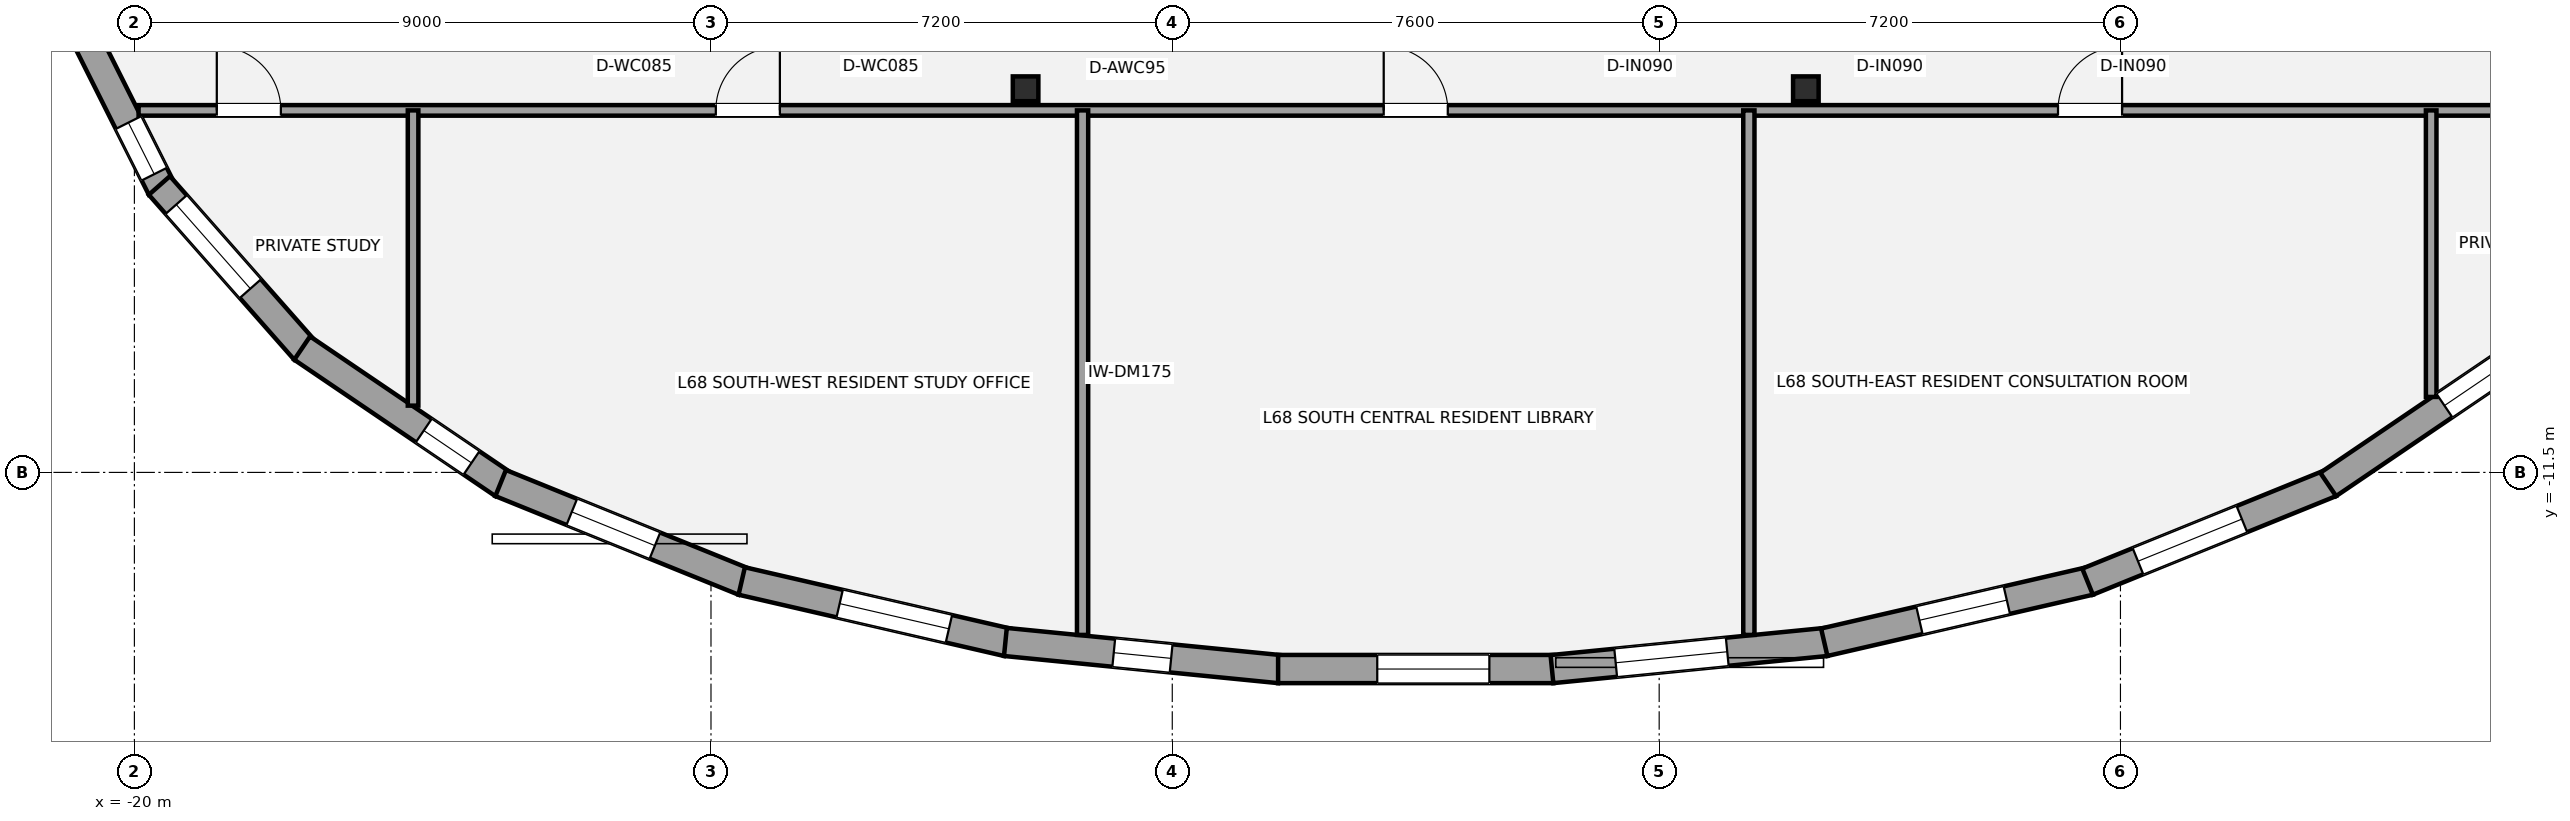
"""IFC4 building model, lengths in metres.
Left out: names, types, materials, properties, quantities, classifications, styles, units other than length and angle.
Written with IfcOpenShell. Run it as: python <this file> out.ifc"""

import sys

from ifc_helpers import new_model, si_unit, direction, frame, frame_2d, origin, origin_2d, place, context, subcontext, project, spatial, rectangle, i_section, extrude, element, fill, save


model = new_model("IFC4")
c1 = context("Model", 3, precision=1e-05, world=origin(), true_north=direction((0.0, 1.0)))
c2 = subcontext(c1, "Body", "Model", "MODEL_VIEW")
j1 = project(units=[si_unit("LENGTHUNIT", "METRE"), si_unit("PLANEANGLEUNIT", "RADIAN")], contexts=[c1])
p1 = place(None, origin())
s1 = spatial("IfcSite", under=j1, at=p1, CompositionType="ELEMENT")
p2 = place(p1, origin())
s2 = spatial("IfcBuilding", under=s1, at=p2, CompositionType="ELEMENT")
p3 = place(p2, frame((0.0, 0.0, 241.5)))
s3 = spatial("IfcBuildingStorey", under=s2, at=p3, CompositionType="ELEMENT", Elevation=241.5)
for number, where, z_axis, x_axis in (
    (1, (-6.09, -5.513, 0.0), (0.0, 0.0, 1.0), (1.0, 0.0, 0.0)),
    (2, (6.09, -5.513, 0.0), (0.0, 0.0, 1.0), (1.0, 0.0, 0.0)),
):
    element("IfcColumn", number, at=place(p3, frame(where, z_axis=z_axis, x_axis=x_axis)), inside=s3, PredefinedType="COLUMN", context=c2, shape_type="SweptSolid", body=[
        extrude(i_section(OverallWidth=0.399, OverallDepth=0.387, WebThickness=0.021, FlangeThickness=0.033, at=origin_2d()), origin(), (0.0, 0.0, 1.0), 3.15),
    ])
p4 = place(p3, frame((-19.578, -7.069, 0.0), z_axis=(0.0, 0.0, 1.0), x_axis=(-0.448424724145, 0.893820601002, 0.0)))
e3 = element("IfcWall", 3, at=p4, inside=s3, PredefinedType="STANDARD", context=c2, shape_type="SweptSolid", body=[
    extrude(rectangle(XDim=3.144, YDim=0.44, at=frame_2d((1.572, 0.0))), origin(), (0.0, 0.0, 1.0), 2.336),
])
p5 = place(p4, frame((0.25, 0.0, 0.58)))
e4 = element("IfcOpeningElement", 4, at=p5, cuts=e3, PredefinedType="OPENING", context=c2, shape_type="SweptSolid", body=[
    extrude(rectangle(XDim=0.9, YDim=1.35, at=frame_2d((0.45, 0.675))), frame((0.0, 0.23, 0.0), z_axis=(0.0, -1.0, 0.0), x_axis=(1.0, 0.0, 0.0)), (0.0, 0.0, 1.0), 0.46),
])
p6 = place(p3, frame((-17.34, -9.596, 0.0), z_axis=(0.0, 0.0, 1.0), x_axis=(-0.66136043846, 0.750068243855, 0.0)))
e5 = element("IfcWall", 5, at=p6, inside=s3, PredefinedType="STANDARD", context=c2, shape_type="SweptSolid", body=[
    extrude(rectangle(XDim=3.432, YDim=0.44, at=frame_2d((1.716, 0.0))), origin(), (0.0, 0.0, 1.0), 2.336),
])
p7 = place(p6, frame((1.285, 0.0, 0.55)))
e6 = element("IfcOpeningElement", 6, at=p7, cuts=e5, PredefinedType="OPENING", context=c2, shape_type="SweptSolid", body=[
    extrude(rectangle(XDim=1.75, YDim=1.55, at=frame_2d((0.875, 0.775))), frame((0.0, 0.23, 0.0), z_axis=(0.0, -1.0, 0.0), x_axis=(1.0, 0.0, 0.0)), (0.0, 0.0, 1.0), 0.46),
])
p8 = place(p3, frame((-14.242, -11.688, 0.0), z_axis=(0.0, 0.0, 1.0), x_axis=(-0.827637036896, 0.561263694851, 0.0)))
e7 = element("IfcWall", 7, at=p8, inside=s3, PredefinedType="STANDARD", context=c2, shape_type="SweptSolid", body=[
    extrude(rectangle(XDim=3.793, YDim=0.44, at=frame_2d((1.896, 0.0))), origin(), (0.0, 0.0, 1.0), 2.336),
])
p9 = place(p8, frame((0.599, 0.0, 0.58)))
e8 = element("IfcOpeningElement", 8, at=p9, cuts=e7, PredefinedType="OPENING", context=c2, shape_type="SweptSolid", body=[
    extrude(rectangle(XDim=0.9, YDim=1.35, at=frame_2d((0.45, 0.675))), frame((0.0, 0.23, 0.0), z_axis=(0.0, -1.0, 0.0), x_axis=(1.0, 0.0, 0.0)), (0.0, 0.0, 1.0), 0.46),
])
p10 = place(p3, frame((-10.487, -13.205, 0.0), z_axis=(0.0, 0.0, 1.0), x_axis=(-0.926731976866, 0.375723093586, 0.0)))
e9 = element("IfcWall", 9, at=p10, inside=s3, PredefinedType="STANDARD", context=c2, shape_type="SweptSolid", body=[
    extrude(rectangle(XDim=4.096, YDim=0.44, at=frame_2d((2.048, 0.0))), origin(), (0.0, 0.0, 1.0), 2.336),
])
p11 = place(p10, frame((1.498, 0.0, 0.55)))
e10 = element("IfcOpeningElement", 10, at=p11, cuts=e9, PredefinedType="OPENING", context=c2, shape_type="SweptSolid", body=[
    extrude(rectangle(XDim=1.4, YDim=1.55, at=frame_2d((0.7, 0.775))), frame((0.0, 0.23, 0.0), z_axis=(0.0, -1.0, 0.0), x_axis=(1.0, 0.0, 0.0)), (0.0, 0.0, 1.0), 0.46),
])
p12 = place(p3, frame((-6.377, -14.151, 0.0), z_axis=(0.0, 0.0, 1.0), x_axis=(-0.974398936081, 0.224825962391, 0.0)))
e11 = element("IfcWall", 11, at=p12, inside=s3, PredefinedType="STANDARD", context=c2, shape_type="SweptSolid", body=[
    extrude(rectangle(XDim=4.252, YDim=0.44, at=frame_2d((2.126, 0.0))), origin(), (0.0, 0.0, 1.0), 2.336),
])
p13 = place(p12, frame((0.933, 0.0, 0.55)))
e12 = element("IfcOpeningElement", 12, at=p13, cuts=e11, PredefinedType="OPENING", context=c2, shape_type="SweptSolid", body=[
    extrude(rectangle(XDim=1.75, YDim=1.55, at=frame_2d((0.875, 0.775))), frame((0.0, 0.23, 0.0), z_axis=(0.0, -1.0, 0.0), x_axis=(1.0, 0.0, 0.0)), (0.0, 0.0, 1.0), 0.46),
])
p14 = place(p3, frame((-2.126, -14.57, 0.0), z_axis=(0.0, 0.0, 1.0), x_axis=(-0.995134540264, 0.098525361068, 0.0)))
e13 = element("IfcWall", 13, at=p14, inside=s3, PredefinedType="STANDARD", context=c2, shape_type="SweptSolid", body=[
    extrude(rectangle(XDim=4.299, YDim=0.44, at=frame_2d((2.15, 0.0))), origin(), (0.0, 0.0, 1.0), 2.336),
])
p15 = place(p14, frame((1.7, 0.0, 0.58)))
e14 = element("IfcOpeningElement", 14, at=p15, cuts=e13, PredefinedType="OPENING", context=c2, shape_type="SweptSolid", body=[
    extrude(rectangle(XDim=0.9, YDim=1.35, at=frame_2d((0.45, 0.675))), frame((0.0, 0.23, 0.0), z_axis=(0.0, -1.0, 0.0), x_axis=(1.0, 0.0, 0.0)), (0.0, 0.0, 1.0), 0.46),
])
p16 = place(p3, frame((2.148, -14.569, 0.0), z_axis=(0.0, 0.0, 1.0), x_axis=(-1.0, 0.0, 0.0)))
e15 = element("IfcWall", 15, at=p16, inside=s3, PredefinedType="STANDARD", context=c2, shape_type="SweptSolid", body=[
    extrude(rectangle(XDim=4.296, YDim=0.44, at=frame_2d((2.148, 0.0))), origin(), (0.0, 0.0, 1.0), 2.336),
])
p17 = place(p16, frame((0.999, 0.0, 0.55)))
e16 = element("IfcOpeningElement", 16, at=p17, cuts=e15, PredefinedType="OPENING", context=c2, shape_type="SweptSolid", body=[
    extrude(rectangle(XDim=1.75, YDim=1.55, at=frame_2d((0.875, 0.775))), frame((0.0, 0.23, 0.0), z_axis=(0.0, -1.0, 0.0), x_axis=(1.0, 0.0, 0.0)), (0.0, 0.0, 1.0), 0.46),
])
p18 = place(p3, frame((6.405, -14.146, 0.0), z_axis=(0.0, 0.0, 1.0), x_axis=(-0.995134540264, -0.098525361068, 0.0)))
e17 = element("IfcWall", 17, at=p18, inside=s3, PredefinedType="STANDARD", context=c2, shape_type="SweptSolid", body=[
    extrude(rectangle(XDim=4.299, YDim=0.44, at=frame_2d((2.15, 0.0))), origin(), (0.0, 0.0, 1.0), 2.336),
])
p19 = place(p18, frame((1.55, 0.0, 0.55)))
e18 = element("IfcOpeningElement", 18, at=p19, cuts=e17, PredefinedType="OPENING", context=c2, shape_type="SweptSolid", body=[
    extrude(rectangle(XDim=1.75, YDim=1.55, at=frame_2d((0.875, 0.775))), frame((0.0, 0.23, 0.0), z_axis=(0.0, -1.0, 0.0), x_axis=(1.0, 0.0, 0.0)), (0.0, 0.0, 1.0), 0.46),
])
p20 = place(p3, frame((10.52, -13.195, 0.0), z_axis=(0.0, 0.0, 1.0), x_axis=(-0.974398936081, -0.224825962391, 0.0)))
e19 = element("IfcWall", 19, at=p20, inside=s3, PredefinedType="STANDARD", context=c2, shape_type="SweptSolid", body=[
    extrude(rectangle(XDim=4.252, YDim=0.44, at=frame_2d((2.126, 0.0))), origin(), (0.0, 0.0, 1.0), 2.336),
])
p21 = place(p20, frame((1.328, 0.0, 0.55)))
e20 = element("IfcOpeningElement", 20, at=p21, cuts=e19, PredefinedType="OPENING", context=c2, shape_type="SweptSolid", body=[
    extrude(rectangle(XDim=1.4, YDim=1.55, at=frame_2d((0.7, 0.775))), frame((0.0, 0.23, 0.0), z_axis=(0.0, -1.0, 0.0), x_axis=(1.0, 0.0, 0.0)), (0.0, 0.0, 1.0), 0.46),
])
p22 = place(p3, frame((14.283, -11.666, 0.0), z_axis=(0.0, 0.0, 1.0), x_axis=(-0.926731976866, -0.375723093586, 0.0)))
e21 = element("IfcWall", 21, at=p22, inside=s3, PredefinedType="STANDARD", context=c2, shape_type="SweptSolid", body=[
    extrude(rectangle(XDim=4.096, YDim=0.44, at=frame_2d((2.048, 0.0))), origin(), (0.0, 0.0, 1.0), 2.336),
])
p23 = place(p22, frame((1.498, 0.0, 0.55)))
e22 = element("IfcOpeningElement", 22, at=p23, cuts=e21, PredefinedType="OPENING", context=c2, shape_type="SweptSolid", body=[
    extrude(rectangle(XDim=1.75, YDim=1.55, at=frame_2d((0.875, 0.775))), frame((0.0, 0.23, 0.0), z_axis=(0.0, -1.0, 0.0), x_axis=(1.0, 0.0, 0.0)), (0.0, 0.0, 1.0), 0.46),
])
p24 = place(p3, frame((17.381, -9.559, 0.0), z_axis=(0.0, 0.0, 1.0), x_axis=(-0.827637036896, -0.561263694851, 0.0)))
e23 = element("IfcWall", 23, at=p24, inside=s3, PredefinedType="STANDARD", context=c2, shape_type="SweptSolid", body=[
    extrude(rectangle(XDim=3.793, YDim=0.44, at=frame_2d((1.896, 0.0))), origin(), (0.0, 0.0, 1.0), 2.336),
])
p25 = place(p24, frame((0.2, 0.0, 0.58)))
e24 = element("IfcOpeningElement", 24, at=p25, cuts=e23, PredefinedType="OPENING", context=c2, shape_type="SweptSolid", body=[
    extrude(rectangle(XDim=1.4, YDim=1.55, at=frame_2d((0.7, 0.775))), frame((0.0, 0.23, 0.0), z_axis=(0.0, -1.0, 0.0), x_axis=(1.0, 0.0, 0.0)), (0.0, 0.0, 1.0), 0.46),
])
p26 = place(p3, frame((-19.935, -5.85, 0.0), z_axis=(0.0, 0.0, 1.0), x_axis=(1.0, 0.0, 0.0)))
e25 = element("IfcWall", 25, at=p26, inside=s3, PredefinedType="PARTITIONING", context=c2, shape_type="SweptSolid", body=[
    extrude(rectangle(XDim=39.869, YDim=0.165, at=frame_2d((19.935, 0.0))), origin(), (0.0, 0.0, 1.0), 2.423),
])
p27 = place(p26, frame((1.221, 0.0, 0.0)))
e26 = element("IfcOpeningElement", 26, at=p27, cuts=e25, PredefinedType="OPENING", context=c2, shape_type="SweptSolid", body=[
    extrude(rectangle(XDim=1.0, YDim=2.15, at=frame_2d((0.5, 1.075))), frame((0.0, 0.093, 0.0), z_axis=(0.0, -1.0, 0.0), x_axis=(1.0, 0.0, 0.0)), (0.0, 0.0, 1.0), 0.185),
])
p28 = place(p26, frame((37.748, 0.0, 0.0)))
e27 = element("IfcOpeningElement", 27, at=p28, cuts=e25, PredefinedType="OPENING", context=c2, shape_type="SweptSolid", body=[
    extrude(rectangle(XDim=1.0, YDim=2.15, at=frame_2d((0.5, 1.075))), frame((0.0, 0.093, 0.0), z_axis=(0.0, -1.0, 0.0), x_axis=(1.0, 0.0, 0.0)), (0.0, 0.0, 1.0), 0.185),
])
p29 = place(p26, frame((9.01, 0.0, 0.0)))
e28 = element("IfcOpeningElement", 28, at=p29, cuts=e25, PredefinedType="OPENING", context=c2, shape_type="SweptSolid", body=[
    extrude(rectangle(XDim=1.0, YDim=2.15, at=frame_2d((0.5, 1.075))), frame((0.0, 0.093, 0.0), z_axis=(0.0, -1.0, 0.0), x_axis=(1.0, 0.0, 0.0)), (0.0, 0.0, 1.0), 0.185),
])
p30 = place(p26, frame((19.435, 0.0, 0.0)))
e29 = element("IfcOpeningElement", 29, at=p30, cuts=e25, PredefinedType="OPENING", context=c2, shape_type="SweptSolid", body=[
    extrude(rectangle(XDim=1.0, YDim=2.15, at=frame_2d((0.5, 1.075))), frame((0.0, 0.093, 0.0), z_axis=(0.0, -1.0, 0.0), x_axis=(1.0, 0.0, 0.0)), (0.0, 0.0, 1.0), 0.185),
])
p31 = place(p26, frame((29.96, 0.0, 0.0)))
e30 = element("IfcOpeningElement", 30, at=p31, cuts=e25, PredefinedType="OPENING", context=c2, shape_type="SweptSolid", body=[
    extrude(rectangle(XDim=1.0, YDim=2.15, at=frame_2d((0.5, 1.075))), frame((0.0, 0.093, 0.0), z_axis=(0.0, -1.0, 0.0), x_axis=(1.0, 0.0, 0.0)), (0.0, 0.0, 1.0), 0.185),
])
p32 = place(p3, frame((-15.65, -10.458, 0.0), z_axis=(0.0, 0.0, 1.0), x_axis=(0.0, 1.0, 0.0)))
e31 = element("IfcWall", 31, at=p32, inside=s3, PredefinedType="PARTITIONING", context=c2, shape_type="SweptSolid", body=[
    extrude(rectangle(XDim=4.608, YDim=0.165, at=frame_2d((2.304, 0.0))), origin(), (0.0, 0.0, 1.0), 2.423),
])
p33 = place(p3, frame((15.85, -10.322, 0.0), z_axis=(0.0, 0.0, 1.0), x_axis=(0.0, 1.0, 0.0)))
e32 = element("IfcWall", 32, at=p33, inside=s3, PredefinedType="PARTITIONING", context=c2, shape_type="SweptSolid", body=[
    extrude(rectangle(XDim=4.472, YDim=0.165, at=frame_2d((2.236, 0.0))), origin(), (0.0, 0.0, 1.0), 2.423),
])
p34 = place(p3, frame((-5.2, -14.036, 0.0), z_axis=(0.0, 0.0, 1.0), x_axis=(0.0, 1.0, 0.0)))
e33 = element("IfcWall", 33, at=p34, inside=s3, PredefinedType="PARTITIONING", context=c2, shape_type="SweptSolid", body=[
    extrude(rectangle(XDim=8.186, YDim=0.175, at=frame_2d((4.093, 0.0))), origin(), (0.0, 0.0, 1.0), 2.423),
])
p35 = place(p3, frame((5.2, -14.036, 0.0), z_axis=(0.0, 0.0, 1.0), x_axis=(0.0, 1.0, 0.0)))
e34 = element("IfcWall", 34, at=p35, inside=s3, PredefinedType="PARTITIONING", context=c2, shape_type="SweptSolid", body=[
    extrude(rectangle(XDim=8.186, YDim=0.175, at=frame_2d((4.093, 0.0))), origin(), (0.0, 0.0, 1.0), 2.97),
])
p36 = place(p5, origin())
e35 = element("IfcWindow", 35, at=p36, inside=s3, PartitioningType="SINGLE_PANEL", PredefinedType="WINDOW", context=c2, shape_type="SweptSolid", body=[
    extrude(rectangle(XDim=0.9, YDim=1.35, at=frame_2d((0.45, 0.675))), frame((0.0, -0.01, 0.0), z_axis=(0.0, -1.0, 0.0), x_axis=(1.0, 0.0, 0.0)), (0.0, 0.0, 1.0), 0.06),
])
fill(e4, e35)
p37 = place(p7, origin())
e36 = element("IfcWindow", 36, at=p37, inside=s3, PartitioningType="SINGLE_PANEL", PredefinedType="WINDOW", context=c2, shape_type="SweptSolid", body=[
    extrude(rectangle(XDim=1.75, YDim=1.55, at=frame_2d((0.875, 0.775))), frame((0.0, -0.01, 0.0), z_axis=(0.0, -1.0, 0.0), x_axis=(1.0, 0.0, 0.0)), (0.0, 0.0, 1.0), 0.06),
])
fill(e6, e36)
p38 = place(p9, origin())
e37 = element("IfcWindow", 37, at=p38, inside=s3, PartitioningType="SINGLE_PANEL", PredefinedType="WINDOW", context=c2, shape_type="SweptSolid", body=[
    extrude(rectangle(XDim=0.9, YDim=1.35, at=frame_2d((0.45, 0.675))), frame((0.0, -0.01, 0.0), z_axis=(0.0, -1.0, 0.0), x_axis=(1.0, 0.0, 0.0)), (0.0, 0.0, 1.0), 0.06),
])
fill(e8, e37)
p39 = place(p11, origin())
e38 = element("IfcWindow", 38, at=p39, inside=s3, PartitioningType="SINGLE_PANEL", PredefinedType="WINDOW", context=c2, shape_type="SweptSolid", body=[
    extrude(rectangle(XDim=1.4, YDim=1.55, at=frame_2d((0.7, 0.775))), frame((0.0, -0.01, 0.0), z_axis=(0.0, -1.0, 0.0), x_axis=(1.0, 0.0, 0.0)), (0.0, 0.0, 1.0), 0.06),
])
fill(e10, e38)
p40 = place(p13, origin())
e39 = element("IfcWindow", 39, at=p40, inside=s3, PartitioningType="SINGLE_PANEL", PredefinedType="WINDOW", context=c2, shape_type="SweptSolid", body=[
    extrude(rectangle(XDim=1.75, YDim=1.55, at=frame_2d((0.875, 0.775))), frame((0.0, -0.01, 0.0), z_axis=(0.0, -1.0, 0.0), x_axis=(1.0, 0.0, 0.0)), (0.0, 0.0, 1.0), 0.06),
])
fill(e12, e39)
p41 = place(p15, origin())
e40 = element("IfcWindow", 40, at=p41, inside=s3, PartitioningType="SINGLE_PANEL", PredefinedType="WINDOW", context=c2, shape_type="SweptSolid", body=[
    extrude(rectangle(XDim=0.9, YDim=1.35, at=frame_2d((0.45, 0.675))), frame((0.0, -0.01, 0.0), z_axis=(0.0, -1.0, 0.0), x_axis=(1.0, 0.0, 0.0)), (0.0, 0.0, 1.0), 0.06),
])
fill(e14, e40)
p42 = place(p17, origin())
e41 = element("IfcWindow", 41, at=p42, inside=s3, PartitioningType="SINGLE_PANEL", PredefinedType="WINDOW", context=c2, shape_type="SweptSolid", body=[
    extrude(rectangle(XDim=1.75, YDim=1.55, at=frame_2d((0.875, 0.775))), frame((0.0, -0.01, 0.0), z_axis=(0.0, -1.0, 0.0), x_axis=(1.0, 0.0, 0.0)), (0.0, 0.0, 1.0), 0.06),
])
fill(e16, e41)
p43 = place(p19, origin())
e42 = element("IfcWindow", 42, at=p43, inside=s3, PartitioningType="SINGLE_PANEL", PredefinedType="WINDOW", context=c2, shape_type="SweptSolid", body=[
    extrude(rectangle(XDim=1.75, YDim=1.55, at=frame_2d((0.875, 0.775))), frame((0.0, -0.01, 0.0), z_axis=(0.0, -1.0, 0.0), x_axis=(1.0, 0.0, 0.0)), (0.0, 0.0, 1.0), 0.06),
])
fill(e18, e42)
p44 = place(p21, origin())
e43 = element("IfcWindow", 43, at=p44, inside=s3, PartitioningType="SINGLE_PANEL", PredefinedType="WINDOW", context=c2, shape_type="SweptSolid", body=[
    extrude(rectangle(XDim=1.4, YDim=1.55, at=frame_2d((0.7, 0.775))), frame((0.0, -0.01, 0.0), z_axis=(0.0, -1.0, 0.0), x_axis=(1.0, 0.0, 0.0)), (0.0, 0.0, 1.0), 0.06),
])
fill(e20, e43)
p45 = place(p23, origin())
e44 = element("IfcWindow", 44, at=p45, inside=s3, PartitioningType="SINGLE_PANEL", PredefinedType="WINDOW", context=c2, shape_type="SweptSolid", body=[
    extrude(rectangle(XDim=1.75, YDim=1.55, at=frame_2d((0.875, 0.775))), frame((0.0, -0.01, 0.0), z_axis=(0.0, -1.0, 0.0), x_axis=(1.0, 0.0, 0.0)), (0.0, 0.0, 1.0), 0.06),
])
fill(e22, e44)
p46 = place(p25, origin())
e45 = element("IfcWindow", 45, at=p46, inside=s3, PartitioningType="SINGLE_PANEL", PredefinedType="WINDOW", context=c2, shape_type="SweptSolid", body=[
    extrude(rectangle(XDim=1.4, YDim=1.55, at=frame_2d((0.7, 0.775))), frame((0.0, -0.01, 0.0), z_axis=(0.0, -1.0, 0.0), x_axis=(1.0, 0.0, 0.0)), (0.0, 0.0, 1.0), 0.06),
])
fill(e24, e45)
p47 = place(p27, origin())
e46 = element("IfcDoor", 46, at=p47, inside=s3, OperationType="SINGLE_SWING_LEFT", PredefinedType="DOOR", context=c2, shape_type="SweptSolid", body=[
    extrude(rectangle(XDim=1.0, YDim=2.15, at=frame_2d((0.5, 1.075))), frame((0.0, 0.025, 0.0), z_axis=(0.0, -1.0, 0.0), x_axis=(1.0, 0.0, 0.0)), (0.0, 0.0, 1.0), 0.05),
])
fill(e26, e46)
p48 = place(p29, origin())
e47 = element("IfcDoor", 47, at=p48, inside=s3, OperationType="SINGLE_SWING_RIGHT", PredefinedType="DOOR", context=c2, shape_type="SweptSolid", body=[
    extrude(rectangle(XDim=1.0, YDim=2.15, at=frame_2d((0.5, 1.075))), frame((0.0, 0.025, 0.0), z_axis=(0.0, -1.0, 0.0), x_axis=(1.0, 0.0, 0.0)), (0.0, 0.0, 1.0), 0.05),
])
fill(e28, e47)
p49 = place(p30, origin())
e48 = element("IfcDoor", 48, at=p49, inside=s3, OperationType="SINGLE_SWING_LEFT", PredefinedType="DOOR", context=c2, shape_type="SweptSolid", body=[
    extrude(rectangle(XDim=1.0, YDim=2.15, at=frame_2d((0.5, 1.075))), frame((0.0, 0.025, 0.0), z_axis=(0.0, -1.0, 0.0), x_axis=(1.0, 0.0, 0.0)), (0.0, 0.0, 1.0), 0.05),
])
fill(e29, e48)
p50 = place(p31, origin())
e49 = element("IfcDoor", 49, at=p50, inside=s3, OperationType="SINGLE_SWING_RIGHT", PredefinedType="DOOR", context=c2, shape_type="SweptSolid", body=[
    extrude(rectangle(XDim=1.0, YDim=2.15, at=frame_2d((0.5, 1.075))), frame((0.0, 0.025, 0.0), z_axis=(0.0, -1.0, 0.0), x_axis=(1.0, 0.0, 0.0)), (0.0, 0.0, 1.0), 0.05),
])
fill(e30, e49)
save(model, sys.argv[1])
